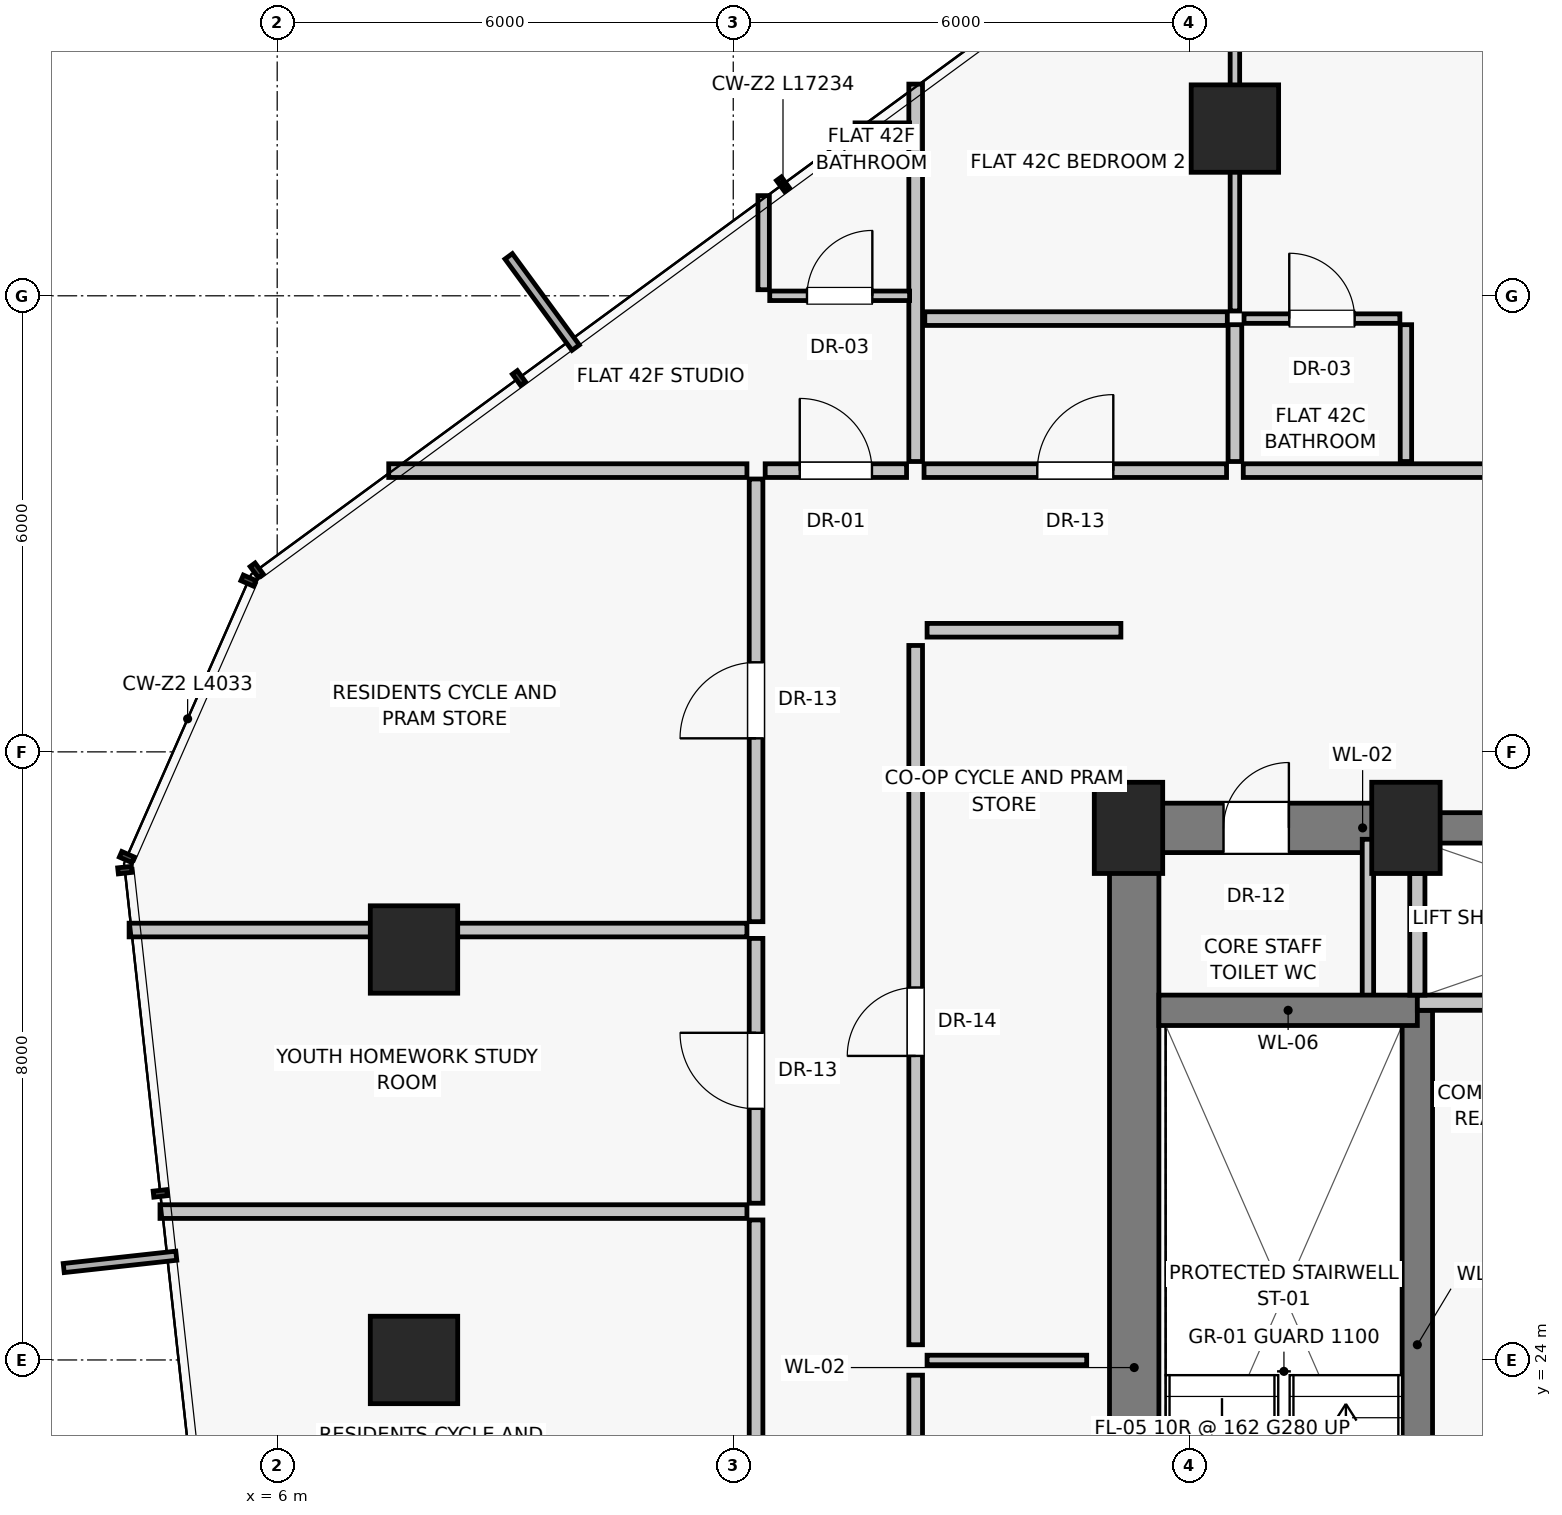
"""IFC4 building model, lengths in metres.
Left out: names, types, materials, properties, quantities, classifications, styles, units other than length and angle.
Written with IfcOpenShell. Run it as: python <this file> out.ifc"""

import sys

from ifc_helpers import new_model, si_unit, direction, frame, frame_2d, origin, origin_2d, place, context, subcontext, project, spatial, rectangle, extrude, source, transform, mapped, element, fill, save


model = new_model("IFC4")
c1 = context("Model", 3, precision=1e-05, world=origin(), true_north=direction((0.0, 1.0)))
c2 = subcontext(c1, "Body", "Model", "MODEL_VIEW")
j1 = project(units=[si_unit("LENGTHUNIT", "METRE"), si_unit("PLANEANGLEUNIT", "RADIAN")], contexts=[c1])
p1 = place(None, origin())
s1 = spatial("IfcSite", under=j1, at=p1, CompositionType="ELEMENT")
p2 = place(p1, origin())
s2 = spatial("IfcBuilding", under=s1, at=p2, CompositionType="ELEMENT")
p3 = place(p2, frame((0.0, 0.0, 149.0)))
s3 = spatial("IfcBuildingStorey", under=s2, at=p3, CompositionType="ELEMENT", Elevation=149.0)
for number, where, z_axis, x_axis in (
    (1, (17.2, 31.0, 0.0), (0.0, 0.0, 1.0), (1.0, 0.0, 0.0)),
    (2, (20.85, 31.0, 0.0), (0.0, 0.0, 1.0), (1.0, 0.0, 0.0)),
):
    element("IfcColumn", number, at=place(p3, frame(where, z_axis=z_axis, x_axis=x_axis)), inside=s3, PredefinedType="PILASTER", context=c2, shape_type="SweptSolid", body=[
        extrude(rectangle(XDim=0.9, YDim=1.2, at=origin_2d()), origin(), (0.0, 0.0, 1.0), 3.25),
    ])
for number, where, z_axis, x_axis in (
    (3, (18.6, 40.2, 0.0), (0.0, 0.0, 1.0), (1.0, 0.0, 0.0)),
    (4, (7.8, 29.4, 0.0), (0.0, 0.0, 1.0), (1.0, 0.0, 0.0)),
    (5, (7.8, 24.0, 0.0), (0.0, 0.0, 1.0), (1.0, 0.0, 0.0)),
):
    element("IfcColumn", number, at=place(p3, frame(where, z_axis=z_axis, x_axis=x_axis)), inside=s3, PredefinedType="COLUMN", context=c2, shape_type="SweptSolid", body=[
        extrude(rectangle(XDim=1.15, YDim=1.15, at=origin_2d()), origin(), (0.0, 0.0, 1.0), 3.25),
    ])
p4 = place(p3, frame((17.275, 16.8, 0.0), z_axis=(0.0, 0.0, 1.0), x_axis=(0.0, 1.0, 0.0)))
e6 = element("IfcWall", 6, at=p4, inside=s3, PredefinedType="SHEAR", context=c2, shape_type="SweptSolid", body=[
    extrude(rectangle(XDim=14.2, YDim=0.65, at=frame_2d((7.1, 0.0))), origin(), (0.0, 0.0, 1.0), 3.0),
])
p5 = place(p3, frame((17.2, 31.0, 0.0), z_axis=(0.0, 0.0, 1.0), x_axis=(1.0, 0.0, 0.0)))
e7 = element("IfcWall", 7, at=p5, inside=s3, PredefinedType="SHEAR", context=c2, shape_type="SweptSolid", body=[
    extrude(rectangle(XDim=3.8, YDim=0.65, at=frame_2d((1.9, 0.0))), origin(), (0.0, 0.0, 1.0), 3.0),
])
p6 = place(p5, frame((1.25, 0.0, 0.0)))
e8 = element("IfcOpeningElement", 8, at=p6, cuts=e7, PredefinedType="OPENING", context=c2, shape_type="SweptSolid", body=[
    extrude(rectangle(XDim=0.86, YDim=2.01, at=frame_2d((0.43, 1.005))), frame((0.0, 0.335, 0.0), z_axis=(0.0, -1.0, 0.0), x_axis=(1.0, 0.0, 0.0)), (0.0, 0.0, 1.0), 0.67),
])
p7 = place(p3, frame((21.0, 31.0, 0.0), z_axis=(0.0, 0.0, 1.0), x_axis=(1.0, 0.0, 0.0)))
e9 = element("IfcWall", 9, at=p7, inside=s3, PredefinedType="SHEAR", context=c2, shape_type="SweptSolid", body=[
    extrude(rectangle(XDim=6.0, YDim=0.4, at=frame_2d((3.0, 0.0))), origin(), (0.0, 0.0, 1.0), 3.0),
])
p8 = place(p3, frame((20.35, 28.65, 0.0), z_axis=(0.0, 0.0, 1.0), x_axis=(0.0, 1.0, 0.0)))
e10 = element("IfcWall", 10, at=p8, inside=s3, PredefinedType="PARTITIONING", context=c2, shape_type="SweptSolid", body=[
    extrude(rectangle(XDim=2.2, YDim=0.15, at=frame_2d((1.1, 0.0))), origin(), (0.0, 0.0, 1.0), 3.0),
])
p9 = place(p3, frame((21.0, 19.8, 0.0), z_axis=(0.0, 0.0, 1.0), x_axis=(0.0, 1.0, 0.0)))
e11 = element("IfcWall", 11, at=p9, inside=s3, PredefinedType="SHEAR", context=c2, shape_type="SweptSolid", body=[
    extrude(rectangle(XDim=8.8, YDim=0.4, at=frame_2d((4.4, 0.0))), origin(), (0.0, 0.0, 1.0), 3.0),
])
p10 = place(p3, frame((17.6, 28.6, 0.0), z_axis=(0.0, 0.0, 1.0), x_axis=(1.0, 0.0, 0.0)))
e12 = element("IfcWall", 12, at=p10, inside=s3, PredefinedType="SHEAR", context=c2, shape_type="SweptSolid", body=[
    extrude(rectangle(XDim=3.4, YDim=0.4, at=frame_2d((1.7, 0.0))), origin(), (0.0, 0.0, 1.0), 3.0),
])
p11 = place(p3, frame((21.0, 28.7, 0.0), z_axis=(0.0, 0.0, 1.0), x_axis=(1.0, 0.0, 0.0)))
e13 = element("IfcWall", 13, at=p11, inside=s3, PredefinedType="SOLIDWALL", context=c2, shape_type="SweptSolid", body=[
    extrude(rectangle(XDim=6.0, YDim=0.2, at=frame_2d((3.0, 0.0))), origin(), (0.0, 0.0, 1.0), 3.0),
])
p12 = place(p3, frame((21.0, 28.8, 0.0), z_axis=(0.0, 0.0, 1.0), x_axis=(0.0, 1.0, 0.0)))
e14 = element("IfcWall", 14, at=p12, inside=s3, PredefinedType="SOLIDWALL", context=c2, shape_type="SweptSolid", body=[
    extrude(rectangle(XDim=1.6, YDim=0.2, at=frame_2d((0.8, 0.0))), origin(), (0.0, 0.0, 1.0), 3.0),
])
p13 = place(p3, frame((14.4, 14.4, 0.0), z_axis=(0.0, 0.0, 1.0), x_axis=(0.0, 1.0, 0.0)))
e15 = element("IfcWall", 15, at=p13, inside=s3, PredefinedType="PARTITIONING", context=c2, shape_type="SweptSolid", body=[
    extrude(rectangle(XDim=9.4, YDim=0.18, at=frame_2d((4.7, 0.0))), origin(), (0.0, 0.0, 1.0), 3.0),
])
p14 = place(p13, frame((3.8, 0.0, 0.0)))
e16 = element("IfcOpeningElement", 16, at=p14, cuts=e15, PredefinedType="OPENING", context=c2, shape_type="SweptSolid", body=[
    extrude(rectangle(XDim=0.9, YDim=2.01, at=frame_2d((0.45, 1.005))), frame((0.0, 0.1, 0.0), z_axis=(0.0, -1.0, 0.0), x_axis=(1.0, 0.0, 0.0)), (0.0, 0.0, 1.0), 0.2),
])
p15 = place(p3, frame((14.4, 24.2, 0.0), z_axis=(0.0, 0.0, 1.0), x_axis=(0.0, 1.0, 0.0)))
e17 = element("IfcWall", 17, at=p15, inside=s3, PredefinedType="PARTITIONING", context=c2, shape_type="SweptSolid", body=[
    extrude(rectangle(XDim=9.2, YDim=0.18, at=frame_2d((4.6, 0.0))), origin(), (0.0, 0.0, 1.0), 3.0),
])
p16 = place(p15, frame((3.8, 0.0, 0.0)))
e18 = element("IfcOpeningElement", 18, at=p16, cuts=e17, PredefinedType="OPENING", context=c2, shape_type="SweptSolid", body=[
    extrude(rectangle(XDim=0.9, YDim=2.01, at=frame_2d((0.45, 1.005))), frame((0.0, 0.1, 0.0), z_axis=(0.0, -1.0, 0.0), x_axis=(1.0, 0.0, 0.0)), (0.0, 0.0, 1.0), 0.2),
])
p17 = place(p3, frame((14.55, 24.0, 0.0), z_axis=(0.0, 0.0, 1.0), x_axis=(1.0, 0.0, 0.0)))
e19 = element("IfcWall", 19, at=p17, inside=s3, PredefinedType="PARTITIONING", context=c2, shape_type="SweptSolid", body=[
    extrude(rectangle(XDim=2.1, YDim=0.125, at=frame_2d((1.05, 0.0))), origin(), (0.0, 0.0, 1.0), 3.0),
])
p18 = place(p3, frame((14.55, 33.6, 0.0), z_axis=(0.0, 0.0, 1.0), x_axis=(1.0, 0.0, 0.0)))
e20 = element("IfcWall", 20, at=p18, inside=s3, PredefinedType="PARTITIONING", context=c2, shape_type="SweptSolid", body=[
    extrude(rectangle(XDim=2.55, YDim=0.18, at=frame_2d((1.275, 0.0))), origin(), (0.0, 0.0, 1.0), 3.0),
])
p19 = place(p3, frame((14.4, 35.82, 0.0), z_axis=(0.0, 0.0, 1.0), x_axis=(0.0, 1.0, 0.0)))
e21 = element("IfcWall", 21, at=p19, inside=s3, PredefinedType="PARTITIONING", context=c2, shape_type="SweptSolid", body=[
    extrude(rectangle(XDim=4.965, YDim=0.18, at=frame_2d((2.482, 0.0))), origin(), (0.0, 0.0, 1.0), 3.0),
])
p20 = place(p3, frame((14.51, 35.7, 0.0), z_axis=(0.0, 0.0, 1.0), x_axis=(1.0, 0.0, 0.0)))
e22 = element("IfcWall", 22, at=p20, inside=s3, PredefinedType="PARTITIONING", context=c2, shape_type="SweptSolid", body=[
    extrude(rectangle(XDim=3.98, YDim=0.18, at=frame_2d((1.99, 0.0))), origin(), (0.0, 0.0, 1.0), 2.58),
])
p21 = place(p20, frame((1.49, 0.0, 0.0)))
e23 = element("IfcOpeningElement", 23, at=p21, cuts=e22, PredefinedType="OPENING", context=c2, shape_type="SweptSolid", body=[
    extrude(rectangle(XDim=1.0, YDim=2.01, at=frame_2d((0.5, 1.005))), frame((0.0, 0.1, 0.0), z_axis=(0.0, -1.0, 0.0), x_axis=(1.0, 0.0, 0.0)), (0.0, 0.0, 1.0), 0.2),
])
p22 = place(p3, frame((18.71, 35.7, 0.0), z_axis=(0.0, 0.0, 1.0), x_axis=(1.0, 0.0, 0.0)))
e24 = element("IfcWall", 24, at=p22, inside=s3, PredefinedType="PARTITIONING", context=c2, shape_type="SweptSolid", body=[
    extrude(rectangle(XDim=14.78, YDim=0.18, at=frame_2d((7.39, 0.0))), origin(), (0.0, 0.0, 1.0), 2.58),
])
p23 = place(p22, frame((5.94, 0.0, 0.0)))
e25 = element("IfcOpeningElement", 25, at=p23, cuts=e24, PredefinedType="OPENING", context=c2, shape_type="SweptSolid", body=[
    extrude(rectangle(XDim=0.95, YDim=2.02, at=frame_2d((0.475, 1.01))), frame((0.0, 0.1, 0.0), z_axis=(0.0, -1.0, 0.0), x_axis=(1.0, 0.0, 0.0)), (0.0, 0.0, 1.0), 0.2),
])
p24 = place(p3, frame((14.52, 37.7, 0.0), z_axis=(0.0, 0.0, 1.0), x_axis=(1.0, 0.0, 0.0)))
e26 = element("IfcWall", 26, at=p24, inside=s3, PredefinedType="PARTITIONING", context=c2, shape_type="SweptSolid", body=[
    extrude(rectangle(XDim=3.98, YDim=0.18, at=frame_2d((1.99, 0.0))), origin(), (0.0, 0.0, 1.0), 3.0),
])
p25 = place(p3, frame((18.6, 35.82, 0.0), z_axis=(0.0, 0.0, 1.0), x_axis=(0.0, 1.0, 0.0)))
e27 = element("IfcWall", 27, at=p25, inside=s3, PredefinedType="PARTITIONING", context=c2, shape_type="SweptSolid", body=[
    extrude(rectangle(XDim=1.8, YDim=0.18, at=frame_2d((0.9, 0.0))), origin(), (0.0, 0.0, 1.0), 2.378),
])
p26 = place(p3, frame((18.6, 37.8, 0.0), z_axis=(0.0, 0.0, 1.0), x_axis=(0.0, 1.0, 0.0)))
e28 = element("IfcWall", 28, at=p26, inside=s3, PredefinedType="PARTITIONING", context=c2, shape_type="SweptSolid", body=[
    extrude(rectangle(XDim=6.066, YDim=0.125, at=frame_2d((3.033, 0.0))), origin(), (0.0, 0.0, 1.0), 2.378),
])
p27 = place(p26, frame((3.973, 0.0, 0.0)))
e29 = element("IfcOpeningElement", 29, at=p27, cuts=e28, PredefinedType="OPENING", context=c2, shape_type="SweptSolid", body=[
    extrude(rectangle(XDim=0.9, YDim=2.01, at=frame_2d((0.45, 1.005))), frame((0.0, 0.073, 0.0), z_axis=(0.0, -1.0, 0.0), x_axis=(1.0, 0.0, 0.0)), (0.0, 0.0, 1.0), 0.145),
])
p28 = place(p3, frame((20.85, 35.82, 0.0), z_axis=(0.0, 0.0, 1.0), x_axis=(0.0, 1.0, 0.0)))
e30 = element("IfcWall", 30, at=p28, inside=s3, PredefinedType="PARTITIONING", context=c2, shape_type="SweptSolid", body=[
    extrude(rectangle(XDim=1.8, YDim=0.15, at=frame_2d((0.9, 0.0))), origin(), (0.0, 0.0, 1.0), 3.0),
])
p29 = place(p3, frame((18.72, 37.7, 0.0), z_axis=(0.0, 0.0, 1.0), x_axis=(1.0, 0.0, 0.0)))
e31 = element("IfcWall", 31, at=p29, inside=s3, PredefinedType="PARTITIONING", context=c2, shape_type="SweptSolid", body=[
    extrude(rectangle(XDim=2.05, YDim=0.125, at=frame_2d((1.025, 0.0))), origin(), (0.0, 0.0, 1.0), 3.0),
])
p30 = place(p29, frame((0.595, 0.0, 0.0)))
e32 = element("IfcOpeningElement", 32, at=p30, cuts=e31, PredefinedType="OPENING", context=c2, shape_type="SweptSolid", body=[
    extrude(rectangle(XDim=0.86, YDim=2.01, at=frame_2d((0.43, 1.005))), frame((0.0, 0.073, 0.0), z_axis=(0.0, -1.0, 0.0), x_axis=(1.0, 0.0, 0.0)), (0.0, 0.0, 1.0), 0.145),
])
p31 = place(p3, frame((12.18, 35.7, 0.0), z_axis=(0.0, 0.0, 1.0), x_axis=(-1.0, 0.0, 0.0)))
e33 = element("IfcWall", 33, at=p31, inside=s3, PredefinedType="PARTITIONING", context=c2, shape_type="SweptSolid", body=[
    extrude(rectangle(XDim=4.713, YDim=0.18, at=frame_2d((2.356, 0.0))), origin(), (0.0, 0.0, 1.0), 3.0),
])
p32 = place(p3, frame((12.3, 17.474, 0.0), z_axis=(0.0, 0.0, 1.0), x_axis=(0.0, 1.0, 0.0)))
e34 = element("IfcWall", 34, at=p32, inside=s3, PredefinedType="PARTITIONING", context=c2, shape_type="SweptSolid", body=[
    extrude(rectangle(XDim=8.368, YDim=0.18, at=frame_2d((4.184, 0.0))), origin(), (0.0, 0.0, 1.0), 2.58),
])
p33 = place(p32, frame((3.684, 0.0, 0.0)))
e35 = element("IfcOpeningElement", 35, at=p33, cuts=e34, PredefinedType="OPENING", context=c2, shape_type="SweptSolid", body=[
    extrude(rectangle(XDim=1.0, YDim=2.01, at=frame_2d((0.5, 1.005))), frame((0.0, 0.1, 0.0), z_axis=(0.0, -1.0, 0.0), x_axis=(1.0, 0.0, 0.0)), (0.0, 0.0, 1.0), 0.2),
])
p34 = place(p3, frame((12.18, 25.952, 0.0), z_axis=(0.0, 0.0, 1.0), x_axis=(-1.0, 0.0, 0.0)))
e36 = element("IfcWall", 36, at=p34, inside=s3, PredefinedType="PARTITIONING", context=c2, shape_type="SweptSolid", body=[
    extrude(rectangle(XDim=7.722, YDim=0.18, at=frame_2d((3.861, 0.0))), origin(), (0.0, 0.0, 1.0), 3.0),
])
p35 = place(p3, frame((12.3, 26.062, 0.0), z_axis=(0.0, 0.0, 1.0), x_axis=(0.0, 1.0, 0.0)))
e37 = element("IfcWall", 37, at=p35, inside=s3, PredefinedType="PARTITIONING", context=c2, shape_type="SweptSolid", body=[
    extrude(rectangle(XDim=3.484, YDim=0.18, at=frame_2d((1.742, 0.0))), origin(), (0.0, 0.0, 1.0), 2.58),
])
p36 = place(p35, frame((1.242, 0.0, 0.0)))
e38 = element("IfcOpeningElement", 38, at=p36, cuts=e37, PredefinedType="OPENING", context=c2, shape_type="SweptSolid", body=[
    extrude(rectangle(XDim=1.0, YDim=2.01, at=frame_2d((0.5, 1.005))), frame((0.0, 0.1, 0.0), z_axis=(0.0, -1.0, 0.0), x_axis=(1.0, 0.0, 0.0)), (0.0, 0.0, 1.0), 0.2),
])
p37 = place(p3, frame((12.3, 29.766, 0.0), z_axis=(0.0, 0.0, 1.0), x_axis=(0.0, 1.0, 0.0)))
e39 = element("IfcWall", 39, at=p37, inside=s3, PredefinedType="PARTITIONING", context=c2, shape_type="SweptSolid", body=[
    extrude(rectangle(XDim=5.824, YDim=0.18, at=frame_2d((2.912, 0.0))), origin(), (0.0, 0.0, 1.0), 2.58),
])
p38 = place(p37, frame((2.412, 0.0, 0.0)))
e40 = element("IfcOpeningElement", 40, at=p38, cuts=e39, PredefinedType="OPENING", context=c2, shape_type="SweptSolid", body=[
    extrude(rectangle(XDim=1.0, YDim=2.01, at=frame_2d((0.5, 1.005))), frame((0.0, 0.1, 0.0), z_axis=(0.0, -1.0, 0.0), x_axis=(1.0, 0.0, 0.0)), (0.0, 0.0, 1.0), 0.2),
])
p39 = place(p3, frame((12.18, 29.656, 0.0), z_axis=(0.0, 0.0, 1.0), x_axis=(-1.0, 0.0, 0.0)))
e41 = element("IfcWall", 41, at=p39, inside=s3, PredefinedType="PARTITIONING", context=c2, shape_type="SweptSolid", body=[
    extrude(rectangle(XDim=8.128, YDim=0.18, at=frame_2d((4.064, 0.0))), origin(), (0.0, 0.0, 1.0), 2.378),
])
p40 = place(p3, frame((12.42, 35.7, 0.0), z_axis=(0.0, 0.0, 1.0), x_axis=(1.0, 0.0, 0.0)))
e42 = element("IfcWall", 42, at=p40, inside=s3, PredefinedType="PARTITIONING", context=c2, shape_type="SweptSolid", body=[
    extrude(rectangle(XDim=1.86, YDim=0.18, at=frame_2d((0.93, 0.0))), origin(), (0.0, 0.0, 1.0), 3.0),
])
p41 = place(p40, frame((0.455, 0.0, 0.0)))
e43 = element("IfcOpeningElement", 43, at=p41, cuts=e42, PredefinedType="OPENING", context=c2, shape_type="SweptSolid", body=[
    extrude(rectangle(XDim=0.95, YDim=2.02, at=frame_2d((0.475, 1.01))), frame((0.0, 0.1, 0.0), z_axis=(0.0, -1.0, 0.0), x_axis=(1.0, 0.0, 0.0)), (0.0, 0.0, 1.0), 0.2),
])
p42 = place(p3, frame((12.48, 38.0, 0.0), z_axis=(0.0, 0.0, 1.0), x_axis=(1.0, 0.0, 0.0)))
e44 = element("IfcWall", 44, at=p42, inside=s3, PredefinedType="PARTITIONING", context=c2, shape_type="SweptSolid", body=[
    extrude(rectangle(XDim=1.84, YDim=0.125, at=frame_2d((0.92, 0.0))), origin(), (0.0, 0.0, 1.0), 3.0),
])
p43 = place(p42, frame((0.49, 0.0, 0.0)))
e45 = element("IfcOpeningElement", 45, at=p43, cuts=e44, PredefinedType="OPENING", context=c2, shape_type="SweptSolid", body=[
    extrude(rectangle(XDim=0.86, YDim=2.01, at=frame_2d((0.43, 1.005))), frame((0.0, 0.073, 0.0), z_axis=(0.0, -1.0, 0.0), x_axis=(1.0, 0.0, 0.0)), (0.0, 0.0, 1.0), 0.145),
])
p44 = place(p3, frame((13.602, 40.2, 0.0), z_axis=(0.0, 0.0, 1.0), x_axis=(1.0, 0.0, 0.0)))
e46 = element("IfcWall", 46, at=p44, inside=s3, PredefinedType="PARTITIONING", context=c2, shape_type="SweptSolid", body=[
    extrude(rectangle(XDim=0.718, YDim=0.15, at=frame_2d((0.359, 0.0))), origin(), (0.0, 0.0, 1.0), 3.0),
])
p45 = place(p3, frame((12.4, 38.08, 0.0), z_axis=(0.0, 0.0, 1.0), x_axis=(0.0, 1.0, 0.0)))
e47 = element("IfcWall", 47, at=p45, inside=s3, PredefinedType="PARTITIONING", context=c2, shape_type="SweptSolid", body=[
    extrude(rectangle(XDim=1.238, YDim=0.15, at=frame_2d((0.619, 0.0))), origin(), (0.0, 0.0, 1.0), 3.0),
])
m1 = source(origin(), c2, "Body", "SweptSolid", [
    extrude(rectangle(XDim=0.86, YDim=2.01, at=frame_2d((0.43, 1.005))), frame((0.0, 0.025, 0.0), z_axis=(0.0, -1.0, 0.0), x_axis=(1.0, 0.0, 0.0)), (0.0, 0.0, 1.0), 0.05),
])
p46 = place(p6, origin())
e48 = element("IfcDoor", 48, at=p46, inside=s3, OperationType="SINGLE_SWING_RIGHT", PredefinedType="DOOR", context=c2, shape_type="MappedRepresentation", body=[
    mapped(m1, transform((0.0, 0.0, 0.0), scale=1.0)),
])
fill(e8, e48)
m2 = source(origin(), c2, "Body", "SweptSolid", [
    extrude(rectangle(XDim=0.9, YDim=2.01, at=frame_2d((0.45, 1.005))), frame((0.0, 0.025, 0.0), z_axis=(0.0, -1.0, 0.0), x_axis=(1.0, 0.0, 0.0)), (0.0, 0.0, 1.0), 0.05),
])
p47 = place(p16, origin())
e49 = element("IfcDoor", 49, at=p47, inside=s3, OperationType="SINGLE_SWING_LEFT", PredefinedType="DOOR", context=c2, shape_type="MappedRepresentation", body=[
    mapped(m2, transform((0.0, 0.0, 0.0), scale=1.0)),
])
fill(e18, e49)
m3 = source(origin(), c2, "Body", "SweptSolid", [
    extrude(rectangle(XDim=1.0, YDim=2.01, at=frame_2d((0.5, 1.005))), frame((0.0, 0.025, 0.0), z_axis=(0.0, -1.0, 0.0), x_axis=(1.0, 0.0, 0.0)), (0.0, 0.0, 1.0), 0.05),
])
p48 = place(p21, origin())
e50 = element("IfcDoor", 50, at=p48, inside=s3, OperationType="SINGLE_SWING_RIGHT", PredefinedType="DOOR", context=c2, shape_type="MappedRepresentation", body=[
    mapped(m3, transform((0.0, 0.0, 0.0), scale=1.0)),
])
fill(e23, e50)
p49 = place(p30, origin())
e51 = element("IfcDoor", 51, at=p49, inside=s3, OperationType="SINGLE_SWING_LEFT", PredefinedType="DOOR", context=c2, shape_type="MappedRepresentation", body=[
    mapped(m1, transform((0.0, 0.0, 0.0), scale=1.0)),
])
fill(e32, e51)
p50 = place(p36, origin())
e52 = element("IfcDoor", 52, at=p50, inside=s3, OperationType="SINGLE_SWING_RIGHT", PredefinedType="DOOR", context=c2, shape_type="MappedRepresentation", body=[
    mapped(m3, transform((0.0, 0.0, 0.0), scale=1.0)),
])
fill(e38, e52)
p51 = place(p38, origin())
e53 = element("IfcDoor", 53, at=p51, inside=s3, OperationType="SINGLE_SWING_LEFT", PredefinedType="DOOR", context=c2, shape_type="MappedRepresentation", body=[
    mapped(m3, transform((0.0, 0.0, 0.0), scale=1.0)),
])
fill(e40, e53)
m4 = source(origin(), c2, "Body", "SweptSolid", [
    extrude(rectangle(XDim=0.95, YDim=2.02, at=frame_2d((0.475, 1.01))), frame((0.0, 0.025, 0.0), z_axis=(0.0, -1.0, 0.0), x_axis=(1.0, 0.0, 0.0)), (0.0, 0.0, 1.0), 0.05),
])
p52 = place(p41, origin())
e54 = element("IfcDoor", 54, at=p52, inside=s3, OperationType="SINGLE_SWING_LEFT", PredefinedType="DOOR", context=c2, shape_type="MappedRepresentation", body=[
    mapped(m4, transform((0.0, 0.0, 0.0), scale=1.0)),
])
fill(e43, e54)
p53 = place(p43, origin())
e55 = element("IfcDoor", 55, at=p53, inside=s3, OperationType="SINGLE_SWING_RIGHT", PredefinedType="DOOR", context=c2, shape_type="MappedRepresentation", body=[
    mapped(m1, transform((0.0, 0.0, 0.0), scale=1.0)),
])
fill(e45, e55)
save(model, sys.argv[1])
